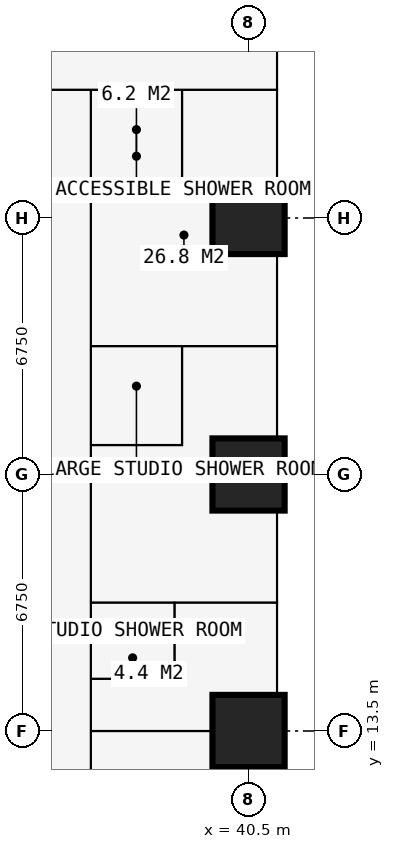
"""IFC4 building model, lengths in metres.
Left out: names, types, materials, properties, quantities, classifications, styles, units other than length and angle.
Written with IfcOpenShell. Run it as: python <this file> out.ifc"""

import sys

from ifc_helpers import new_model, si_unit, direction, frame, frame_2d, origin, origin_2d, place, context, subcontext, project, spatial, rectangle, extrude, element, fill, save


model = new_model("IFC4")
c1 = context("Model", 3, precision=1e-05, world=origin(), true_north=direction((0.0, 1.0)))
c2 = subcontext(c1, "Body", "Model", "MODEL_VIEW")
j1 = project(units=[si_unit("LENGTHUNIT", "METRE"), si_unit("PLANEANGLEUNIT", "RADIAN")], contexts=[c1])
p1 = place(None, origin())
s1 = spatial("IfcSite", under=j1, at=p1, CompositionType="ELEMENT")
p2 = place(p1, origin())
s2 = spatial("IfcBuilding", under=s1, at=p2, CompositionType="ELEMENT")
p3 = place(p2, frame((0.0, 0.0, 39.6)))
s3 = spatial("IfcBuildingStorey", under=s2, at=p3, CompositionType="ELEMENT", Elevation=39.6)
for number, where, z_axis, x_axis in (
    (1, (40.5, 13.5, 0.0), (0.0, 0.0, 1.0), (1.0, 0.0, 0.0)),
    (2, (40.5, 20.25, 0.0), (0.0, 0.0, 1.0), (1.0, 0.0, 0.0)),
    (3, (40.5, 27.0, 0.0), (0.0, 0.0, 1.0), (1.0, 0.0, 0.0)),
):
    element("IfcColumn", number, at=place(p3, frame(where, z_axis=z_axis, x_axis=x_axis)), inside=s3, PredefinedType="COLUMN", context=c2, shape_type="SweptSolid", body=[
        extrude(rectangle(XDim=1.9, YDim=1.9, at=origin_2d()), origin(), (0.0, 0.0, 1.0), 3.6),
    ])
p4 = place(p3, frame((41.25, 20.25, 0.0), z_axis=(0.0, 0.0, 1.0), x_axis=(0.0, -1.0, 0.0)))
e4 = element("IfcWall", 4, at=p4, inside=s3, PredefinedType="SOLIDWALL", context=c2, shape_type="SweptSolid", body=[
    extrude(rectangle(XDim=6.75, YDim=0.15, at=frame_2d((3.375, 0.0))), origin(), (0.0, 0.0, 1.0), 3.375),
])
p5 = place(p4, frame((0.996, 0.0, 0.0)))
e5 = element("IfcOpeningElement", 5, at=p5, cuts=e4, PredefinedType="OPENING", context=c2, shape_type="SweptSolid", body=[
    extrude(rectangle(XDim=1.0, YDim=2.2, at=frame_2d((0.5, 1.1))), frame((0.0, 0.085, 0.0), z_axis=(0.0, -1.0, 0.0), x_axis=(1.0, 0.0, 0.0)), (0.0, 0.0, 1.0), 0.17),
])
p6 = place(p4, frame((2.042, 0.0, 0.9)))
e6 = element("IfcOpeningElement", 6, at=p6, cuts=e4, PredefinedType="OPENING", context=c2, shape_type="SweptSolid", body=[
    extrude(rectangle(XDim=1.2, YDim=1.8, at=frame_2d((0.6, 0.9))), frame((0.0, 0.085, 0.0), z_axis=(0.0, -1.0, 0.0), x_axis=(1.0, 0.0, 0.0)), (0.0, 0.0, 1.0), 0.17),
])
p7 = place(p4, frame((4.754, 0.0, 0.0)))
e7 = element("IfcOpeningElement", 7, at=p7, cuts=e4, PredefinedType="OPENING", context=c2, shape_type="SweptSolid", body=[
    extrude(rectangle(XDim=1.0, YDim=2.2, at=frame_2d((0.5, 1.1))), frame((0.0, 0.085, 0.0), z_axis=(0.0, -1.0, 0.0), x_axis=(1.0, 0.0, 0.0)), (0.0, 0.0, 1.0), 0.17),
])
p8 = place(p4, frame((3.508, 0.0, 0.9)))
e8 = element("IfcOpeningElement", 8, at=p8, cuts=e4, PredefinedType="OPENING", context=c2, shape_type="SweptSolid", body=[
    extrude(rectangle(XDim=1.2, YDim=1.8, at=frame_2d((0.6, 0.9))), frame((0.0, 0.085, 0.0), z_axis=(0.0, -1.0, 0.0), x_axis=(1.0, 0.0, 0.0)), (0.0, 0.0, 1.0), 0.17),
])
p9 = place(p3, frame((41.35, 16.875, 0.0), z_axis=(0.0, 0.0, 1.0), x_axis=(1.0, 0.0, 0.0)))
e9 = element("IfcWall", 9, at=p9, inside=s3, PredefinedType="USERDEFINED", context=c2, shape_type="SweptSolid", body=[
    extrude(rectangle(XDim=2.2, YDim=1.0, at=frame_2d((1.1, 0.0))), origin(), (0.0, 0.0, 1.0), 0.9),
])
p10 = place(p3, frame((30.375, 30.375, 0.0), z_axis=(0.0, 0.0, 1.0), x_axis=(1.0, 0.0, 0.0)))
e10 = element("IfcWall", 10, at=p10, inside=s3, PredefinedType="PARTITIONING", context=c2, shape_type="SweptSolid", body=[
    extrude(rectangle(XDim=10.859, YDim=0.15, at=frame_2d((5.429, 0.0))), origin(), (0.0, 0.0, 1.0), 3.375),
])
p11 = place(p10, frame((4.725, 0.0, 0.0)))
e11 = element("IfcOpeningElement", 11, at=p11, cuts=e10, PredefinedType="OPENING", context=c2, shape_type="SweptSolid", body=[
    extrude(rectangle(XDim=1.0, YDim=2.2, at=frame_2d((0.5, 1.1))), frame((0.0, 0.085, 0.0), z_axis=(0.0, -1.0, 0.0), x_axis=(1.0, 0.0, 0.0)), (0.0, 0.0, 1.0), 0.17),
])
p12 = place(p3, frame((36.35, 6.75, 0.0), z_axis=(0.0, 0.0, 1.0), x_axis=(0.0, 1.0, 0.0)))
e12 = element("IfcWall", 12, at=p12, inside=s3, PredefinedType="PARTITIONING", context=c2, shape_type="SweptSolid", body=[
    extrude(rectangle(XDim=23.625, YDim=0.15, at=frame_2d((11.812, 0.0))), origin(), (0.0, 0.0, 1.0), 3.375),
])
p13 = place(p12, frame((18.475, 0.0, 0.0)))
e13 = element("IfcOpeningElement", 13, at=p13, cuts=e12, PredefinedType="OPENING", context=c2, shape_type="SweptSolid", body=[
    extrude(rectangle(XDim=0.95, YDim=2.2, at=frame_2d((0.475, 1.1))), frame((0.0, 0.085, 0.0), z_axis=(0.0, -1.0, 0.0), x_axis=(1.0, 0.0, 0.0)), (0.0, 0.0, 1.0), 0.17),
])
p14 = place(p12, frame((11.725, 0.0, 0.0)))
e14 = element("IfcOpeningElement", 14, at=p14, cuts=e12, PredefinedType="OPENING", context=c2, shape_type="SweptSolid", body=[
    extrude(rectangle(XDim=0.95, YDim=2.2, at=frame_2d((0.475, 1.1))), frame((0.0, 0.085, 0.0), z_axis=(0.0, -1.0, 0.0), x_axis=(1.0, 0.0, 0.0)), (0.0, 0.0, 1.0), 0.17),
])
p15 = place(p12, frame((6.95, 0.0, 0.0)))
e15 = element("IfcOpeningElement", 15, at=p15, cuts=e12, PredefinedType="OPENING", context=c2, shape_type="SweptSolid", body=[
    extrude(rectangle(XDim=0.95, YDim=2.2, at=frame_2d((0.475, 1.1))), frame((0.0, 0.085, 0.0), z_axis=(0.0, -1.0, 0.0), x_axis=(1.0, 0.0, 0.0)), (0.0, 0.0, 1.0), 0.17),
])
p16 = place(p3, frame((36.35, 13.5, 0.0), z_axis=(0.0, 0.0, 1.0), x_axis=(1.0, 0.0, 0.0)))
e16 = element("IfcWall", 16, at=p16, inside=s3, PredefinedType="PARTITIONING", context=c2, shape_type="SweptSolid", body=[
    extrude(rectangle(XDim=4.884, YDim=0.15, at=frame_2d((2.442, 0.0))), origin(), (0.0, 0.0, 1.0), 2.877),
])
p17 = place(p3, frame((36.35, 14.875, 0.0), z_axis=(0.0, 0.0, 1.0), x_axis=(1.0, 0.0, 0.0)))
e17 = element("IfcWall", 17, at=p17, inside=s3, PredefinedType="PARTITIONING", context=c2, shape_type="SweptSolid", body=[
    extrude(rectangle(XDim=2.2, YDim=0.1, at=frame_2d((1.1, 0.0))), origin(), (0.0, 0.0, 1.0), 3.375),
])
p18 = place(p3, frame((36.35, 16.875, 0.0), z_axis=(0.0, 0.0, 1.0), x_axis=(1.0, 0.0, 0.0)))
e18 = element("IfcWall", 18, at=p18, inside=s3, PredefinedType="PARTITIONING", context=c2, shape_type="SweptSolid", body=[
    extrude(rectangle(XDim=4.884, YDim=0.175, at=frame_2d((2.442, 0.0))), origin(), (0.0, 0.0, 1.0), 3.375),
])
p19 = place(p18, frame((0.65, 0.0, 0.0)))
e19 = element("IfcOpeningElement", 19, at=p19, cuts=e18, PredefinedType="OPENING", context=c2, shape_type="SweptSolid", body=[
    extrude(rectangle(XDim=0.9, YDim=2.2, at=frame_2d((0.45, 1.1))), frame((0.0, 0.097, 0.0), z_axis=(0.0, -1.0, 0.0), x_axis=(1.0, 0.0, 0.0)), (0.0, 0.0, 1.0), 0.195),
])
p20 = place(p3, frame((36.35, 21.025, 0.0), z_axis=(0.0, 0.0, 1.0), x_axis=(1.0, 0.0, 0.0)))
e20 = element("IfcWall", 20, at=p20, inside=s3, PredefinedType="PARTITIONING", context=c2, shape_type="SweptSolid", body=[
    extrude(rectangle(XDim=2.4, YDim=0.1, at=frame_2d((1.2, 0.0))), origin(), (0.0, 0.0, 1.0), 3.375),
])
p21 = place(p3, frame((36.35, 23.625, 0.0), z_axis=(0.0, 0.0, 1.0), x_axis=(1.0, 0.0, 0.0)))
e21 = element("IfcWall", 21, at=p21, inside=s3, PredefinedType="PARTITIONING", context=c2, shape_type="SweptSolid", body=[
    extrude(rectangle(XDim=4.884, YDim=0.175, at=frame_2d((2.442, 0.0))), origin(), (0.0, 0.0, 1.0), 3.375),
])
p22 = place(p21, frame((0.75, 0.0, 0.0)))
e22 = element("IfcOpeningElement", 22, at=p22, cuts=e21, PredefinedType="OPENING", context=c2, shape_type="SweptSolid", body=[
    extrude(rectangle(XDim=0.9, YDim=2.2, at=frame_2d((0.45, 1.1))), frame((0.0, 0.097, 0.0), z_axis=(0.0, -1.0, 0.0), x_axis=(1.0, 0.0, 0.0)), (0.0, 0.0, 1.0), 0.195),
])
p23 = place(p3, frame((36.35, 27.775, 0.0), z_axis=(0.0, 0.0, 1.0), x_axis=(1.0, 0.0, 0.0)))
e23 = element("IfcWall", 23, at=p23, inside=s3, PredefinedType="PARTITIONING", context=c2, shape_type="SweptSolid", body=[
    extrude(rectangle(XDim=2.4, YDim=0.1, at=frame_2d((1.2, 0.0))), origin(), (0.0, 0.0, 1.0), 3.375),
])
p24 = place(p3, frame((38.55, 14.875, 0.0), z_axis=(0.0, 0.0, 1.0), x_axis=(0.0, 1.0, 0.0)))
e24 = element("IfcWall", 24, at=p24, inside=s3, PredefinedType="PARTITIONING", context=c2, shape_type="SweptSolid", body=[
    extrude(rectangle(XDim=2.0, YDim=0.1, at=frame_2d((1.0, 0.0))), origin(), (0.0, 0.0, 1.0), 3.375),
])
p25 = place(p3, frame((38.75, 21.025, 0.0), z_axis=(0.0, 0.0, 1.0), x_axis=(0.0, 1.0, 0.0)))
e25 = element("IfcWall", 25, at=p25, inside=s3, PredefinedType="PARTITIONING", context=c2, shape_type="SweptSolid", body=[
    extrude(rectangle(XDim=2.6, YDim=0.1, at=frame_2d((1.3, 0.0))), origin(), (0.0, 0.0, 1.0), 3.375),
])
p26 = place(p3, frame((38.75, 27.775, 0.0), z_axis=(0.0, 0.0, 1.0), x_axis=(0.0, 1.0, 0.0)))
e26 = element("IfcWall", 26, at=p26, inside=s3, PredefinedType="PARTITIONING", context=c2, shape_type="SweptSolid", body=[
    extrude(rectangle(XDim=2.6, YDim=0.1, at=frame_2d((1.3, 0.0))), origin(), (0.0, 0.0, 1.0), 3.375),
])
p27 = place(p26, frame((0.85, 0.0, 0.0)))
e27 = element("IfcOpeningElement", 27, at=p27, cuts=e26, PredefinedType="OPENING", context=c2, shape_type="SweptSolid", body=[
    extrude(rectangle(XDim=0.9, YDim=2.2, at=frame_2d((0.45, 1.1))), frame((0.0, 0.06, 0.0), z_axis=(0.0, -1.0, 0.0), x_axis=(1.0, 0.0, 0.0)), (0.0, 0.0, 1.0), 0.12),
])
p28 = place(p5, origin())
e28 = element("IfcDoor", 28, at=p28, inside=s3, OperationType="SINGLE_SWING_LEFT", PredefinedType="DOOR", context=c2, shape_type="SweptSolid", body=[
    extrude(rectangle(XDim=1.0, YDim=2.2, at=frame_2d((0.5, 1.1))), frame((0.0, 0.025, 0.0), z_axis=(0.0, -1.0, 0.0), x_axis=(1.0, 0.0, 0.0)), (0.0, 0.0, 1.0), 0.05),
])
fill(e5, e28)
p29 = place(p6, origin())
e29 = element("IfcWindow", 29, at=p29, inside=s3, PartitioningType="SINGLE_PANEL", PredefinedType="WINDOW", context=c2, shape_type="SweptSolid", body=[
    extrude(rectangle(XDim=1.2, YDim=1.8, at=frame_2d((0.6, 0.9))), frame((0.0, 0.03, 0.0), z_axis=(0.0, -1.0, 0.0), x_axis=(1.0, 0.0, 0.0)), (0.0, 0.0, 1.0), 0.06),
])
fill(e6, e29)
p30 = place(p7, origin())
e30 = element("IfcDoor", 30, at=p30, inside=s3, OperationType="SINGLE_SWING_RIGHT", PredefinedType="DOOR", context=c2, shape_type="SweptSolid", body=[
    extrude(rectangle(XDim=1.0, YDim=2.2, at=frame_2d((0.5, 1.1))), frame((0.0, 0.025, 0.0), z_axis=(0.0, -1.0, 0.0), x_axis=(1.0, 0.0, 0.0)), (0.0, 0.0, 1.0), 0.05),
])
fill(e7, e30)
p31 = place(p8, origin())
e31 = element("IfcWindow", 31, at=p31, inside=s3, PartitioningType="SINGLE_PANEL", PredefinedType="WINDOW", context=c2, shape_type="SweptSolid", body=[
    extrude(rectangle(XDim=1.2, YDim=1.8, at=frame_2d((0.6, 0.9))), frame((0.0, 0.03, 0.0), z_axis=(0.0, -1.0, 0.0), x_axis=(1.0, 0.0, 0.0)), (0.0, 0.0, 1.0), 0.06),
])
fill(e8, e31)
p32 = place(p13, origin())
e32 = element("IfcDoor", 32, at=p32, inside=s3, OperationType="SINGLE_SWING_LEFT", PredefinedType="DOOR", context=c2, shape_type="SweptSolid", body=[
    extrude(rectangle(XDim=0.95, YDim=2.2, at=frame_2d((0.475, 1.1))), frame((0.0, 0.025, 0.0), z_axis=(0.0, -1.0, 0.0), x_axis=(1.0, 0.0, 0.0)), (0.0, 0.0, 1.0), 0.05),
])
fill(e13, e32)
p33 = place(p27, origin())
e33 = element("IfcDoor", 33, at=p33, inside=s3, OperationType="SINGLE_SWING_RIGHT", PredefinedType="DOOR", context=c2, shape_type="SweptSolid", body=[
    extrude(rectangle(XDim=0.9, YDim=2.2, at=frame_2d((0.45, 1.1))), frame((0.0, 0.025, 0.0), z_axis=(0.0, -1.0, 0.0), x_axis=(1.0, 0.0, 0.0)), (0.0, 0.0, 1.0), 0.05),
])
fill(e27, e33)
p34 = place(p14, origin())
e34 = element("IfcDoor", 34, at=p34, inside=s3, OperationType="SINGLE_SWING_LEFT", PredefinedType="DOOR", context=c2, shape_type="SweptSolid", body=[
    extrude(rectangle(XDim=0.95, YDim=2.2, at=frame_2d((0.475, 1.1))), frame((0.0, 0.025, 0.0), z_axis=(0.0, -1.0, 0.0), x_axis=(1.0, 0.0, 0.0)), (0.0, 0.0, 1.0), 0.05),
])
fill(e14, e34)
p35 = place(p22, origin())
e35 = element("IfcDoor", 35, at=p35, inside=s3, OperationType="SINGLE_SWING_RIGHT", PredefinedType="DOOR", context=c2, shape_type="SweptSolid", body=[
    extrude(rectangle(XDim=0.9, YDim=2.2, at=frame_2d((0.45, 1.1))), frame((0.0, 0.025, 0.0), z_axis=(0.0, -1.0, 0.0), x_axis=(1.0, 0.0, 0.0)), (0.0, 0.0, 1.0), 0.05),
])
fill(e22, e35)
p36 = place(p15, origin())
e36 = element("IfcDoor", 36, at=p36, inside=s3, OperationType="SINGLE_SWING_LEFT", PredefinedType="DOOR", context=c2, shape_type="SweptSolid", body=[
    extrude(rectangle(XDim=0.95, YDim=2.2, at=frame_2d((0.475, 1.1))), frame((0.0, 0.025, 0.0), z_axis=(0.0, -1.0, 0.0), x_axis=(1.0, 0.0, 0.0)), (0.0, 0.0, 1.0), 0.05),
])
fill(e15, e36)
p37 = place(p19, origin())
e37 = element("IfcDoor", 37, at=p37, inside=s3, OperationType="SINGLE_SWING_RIGHT", PredefinedType="DOOR", context=c2, shape_type="SweptSolid", body=[
    extrude(rectangle(XDim=0.9, YDim=2.2, at=frame_2d((0.45, 1.1))), frame((0.0, 0.025, 0.0), z_axis=(0.0, -1.0, 0.0), x_axis=(1.0, 0.0, 0.0)), (0.0, 0.0, 1.0), 0.05),
])
fill(e19, e37)
p38 = place(p11, origin())
e38 = element("IfcDoor", 38, at=p38, inside=s3, OperationType="SINGLE_SWING_LEFT", PredefinedType="DOOR", context=c2, shape_type="SweptSolid", body=[
    extrude(rectangle(XDim=1.0, YDim=2.2, at=frame_2d((0.5, 1.1))), frame((0.0, 0.025, 0.0), z_axis=(0.0, -1.0, 0.0), x_axis=(1.0, 0.0, 0.0)), (0.0, 0.0, 1.0), 0.05),
])
fill(e11, e38)
save(model, sys.argv[1])
